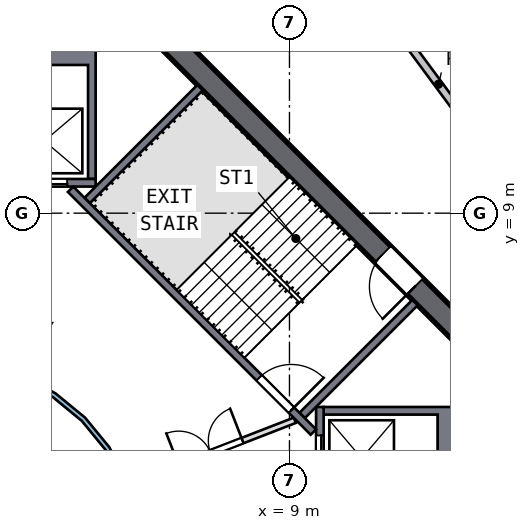
"""IFC4 building model, lengths in metres.
Left out: names, types, materials, properties, quantities, classifications, styles, units other than length and angle.
Written with IfcOpenShell. Run it as: python <this file> out.ifc"""

import sys

from ifc_helpers import new_model, si_unit, direction, frame, frame_2d, origin, place, context, subcontext, project, spatial, polyline, rectangle, outline, extrude, element, fill, save


model = new_model("IFC4")
c1 = context("Model", 3, precision=1e-05, world=origin(), true_north=direction((0.0, 1.0)))
c2 = subcontext(c1, "Body", "Model", "MODEL_VIEW")
j1 = project(units=[si_unit("LENGTHUNIT", "METRE"), si_unit("PLANEANGLEUNIT", "RADIAN")], contexts=[c1])
p1 = place(None, origin())
s1 = spatial("IfcSite", under=j1, at=p1, CompositionType="ELEMENT")
p2 = place(p1, origin())
s2 = spatial("IfcBuilding", under=s1, at=p2, CompositionType="ELEMENT")
p3 = place(p2, frame((0.0, 0.0, 183.5)))
s3 = spatial("IfcBuildingStorey", under=s2, at=p3, CompositionType="ELEMENT", Elevation=183.5)
p4 = place(p3, frame((13.788, 5.587, 0.0), z_axis=(0.0, 0.0, 1.0), x_axis=(-0.707106781, 0.707106781, 0.0)))
e1 = element("IfcWall", 1, at=p4, inside=s3, PredefinedType="SHEAR", context=c2, shape_type="SweptSolid", body=[
    extrude(rectangle(XDim=11.598, YDim=0.6, at=frame_2d((5.799, 0.0))), origin(), (0.0, 0.0, 1.0), 3.5),
])
p5 = place(p4, frame((2.099, 0.0, 0.0)))
e2 = element("IfcOpeningElement", 2, at=p5, cuts=e1, PredefinedType="OPENING", context=c2, shape_type="SweptSolid", body=[
    extrude(rectangle(XDim=1.2, YDim=2.1, at=frame_2d((0.6, 1.05))), frame((0.0, 0.31, 0.0), z_axis=(0.0, -1.0, 0.0), x_axis=(1.0, 0.0, 0.0)), (0.0, 0.0, 1.0), 0.62),
])
p6 = place(p3, origin())
e3 = element("IfcWall", 3, at=p6, inside=s3, PredefinedType="SOLIDWALL", context=c2, shape_type="SweptSolid", body=[
    extrude(outline(polyline([(13.4, 3.9), (13.4, 1.2), (9.9, 1.2), (9.9, 1.4), (12.9, 1.4), (12.9, 3.7), (9.9, 3.7), (9.9, 3.9), (13.4, 3.9)])), origin(), (0.0, 0.0, 1.0), 3.19),
])
p7 = place(p3, frame((9.8, 1.2, 0.0), z_axis=(0.0, 0.0, 1.0), x_axis=(0.0, 1.0, 0.0)))
e4 = element("IfcWall", 4, at=p7, inside=s3, PredefinedType="SOLIDWALL", context=c2, shape_type="SweptSolid", body=[
    extrude(rectangle(XDim=2.7, YDim=0.2, at=frame_2d((1.35, 0.0))), origin(), (0.0, 0.0, 1.0), 3.19),
])
p8 = place(p7, frame((0.75, 0.0, 0.0)))
e5 = element("IfcOpeningElement", 5, at=p8, cuts=e4, PredefinedType="OPENING", context=c2, shape_type="SweptSolid", body=[
    extrude(rectangle(XDim=1.2, YDim=2.1, at=frame_2d((0.6, 1.05))), frame((0.0, 0.11, 0.0), z_axis=(0.0, -1.0, 0.0), x_axis=(1.0, 0.0, 0.0)), (0.0, 0.0, 1.0), 0.22),
])
p9 = place(p3, origin())
e6 = element("IfcWall", 6, at=p9, inside=s3, PredefinedType="SOLIDWALL", context=c2, shape_type="SweptSolid", body=[
    extrude(outline(polyline([(3.9, 9.9), (3.7, 9.9), (3.7, 12.9), (1.4, 12.9), (1.4, 9.9), (1.2, 9.9), (1.2, 13.4), (3.9, 13.4), (3.9, 9.9)])), origin(), (0.0, 0.0, 1.0), 3.19),
])
p10 = place(p3, frame((1.2, 9.8, 0.0), z_axis=(0.0, 0.0, 1.0), x_axis=(1.0, 0.0, 0.0)))
e7 = element("IfcWall", 7, at=p10, inside=s3, PredefinedType="SOLIDWALL", context=c2, shape_type="SweptSolid", body=[
    extrude(rectangle(XDim=2.7, YDim=0.2, at=frame_2d((1.35, 0.0))), origin(), (0.0, 0.0, 1.0), 3.19),
])
p11 = place(p10, frame((0.75, 0.0, 0.0)))
e8 = element("IfcOpeningElement", 8, at=p11, cuts=e7, PredefinedType="OPENING", context=c2, shape_type="SweptSolid", body=[
    extrude(rectangle(XDim=1.2, YDim=2.1, at=frame_2d((0.6, 1.05))), frame((0.0, 0.11, 0.0), z_axis=(0.0, -1.0, 0.0), x_axis=(1.0, 0.0, 0.0)), (0.0, 0.0, 1.0), 0.22),
])
p12 = place(p3, frame((3.24, 9.629, 0.0), z_axis=(0.0, 0.0, 1.0), x_axis=(0.707106781, -0.707106781, 0.0)))
e9 = element("IfcWall", 9, at=p12, inside=s3, PredefinedType="SOLIDWALL", context=c2, shape_type="SweptSolid", body=[
    extrude(rectangle(XDim=9.036, YDim=0.2, at=frame_2d((4.518, 0.0))), origin(), (0.0, 0.0, 1.0), 3.19),
])
p13 = place(p12, frame((7.018, 0.0, 0.0)))
e10 = element("IfcOpeningElement", 10, at=p13, cuts=e9, PredefinedType="OPENING", context=c2, shape_type="SweptSolid", body=[
    extrude(rectangle(XDim=1.2, YDim=2.1, at=frame_2d((0.6, 1.05))), frame((0.0, 0.11, 0.0), z_axis=(0.0, -1.0, 0.0), x_axis=(1.0, 0.0, 0.0)), (0.0, 0.0, 1.0), 0.22),
])
for number, where, z_axis, x_axis in (
    (11, (9.334, 3.677, 0.0), (0.0, 0.0, 1.0), (0.707, 0.707, 0.0)),
    (12, (3.677, 9.334, 0.0), (0.0, 0.0, 1.0), (0.707, 0.707, 0.0)),
):
    element("IfcWall", number, at=place(p3, frame(where, z_axis=z_axis, x_axis=x_axis)), inside=s3, PredefinedType="SOLIDWALL", context=c2, shape_type="SweptSolid", body=[
        extrude(rectangle(XDim=4.2, YDim=0.2, at=frame_2d((2.1, 0.0))), origin(), (0.0, 0.0, 1.0), 3.19),
    ])
p14 = place(p3, frame((4.782, 1.857, 0.0), z_axis=(0.0, 0.0, 1.0), x_axis=(0.932157474, 0.362053096, 0.0)))
e13 = element("IfcWall", 13, at=p14, inside=s3, PredefinedType="PARTITIONING", context=c2, shape_type="SweptSolid", body=[
    extrude(rectangle(XDim=4.675, YDim=0.15, at=frame_2d((2.337, 0.0))), origin(), (0.0, 0.0, 1.0), 3.19),
])
p15 = place(p14, frame((1.4, 0.0, 0.0)))
e14 = element("IfcOpeningElement", 14, at=p15, cuts=e13, PredefinedType="OPENING", context=c2, shape_type="SweptSolid", body=[
    extrude(rectangle(XDim=1.8, YDim=2.1, at=frame_2d((0.9, 1.05))), frame((0.0, 0.085, 0.0), z_axis=(0.0, -1.0, 0.0), x_axis=(1.0, 0.0, 0.0)), (0.0, 0.0, 1.0), 0.17),
])
p16 = place(p3, origin())
e15 = element("IfcWall", 15, at=p16, inside=s3, PredefinedType="SOLIDWALL", context=c2, shape_type="SweptSolid", body=[
    extrude(outline(polyline([(5.021, -0.999), (4.73, -1.959), (4.257, -2.844), (3.62, -3.62), (2.844, -4.257), (1.959, -4.73), (0.999, -5.021), (0.0, -5.12), (-0.999, -5.021), (-1.959, -4.73), (-2.844, -4.257), (-3.62, -3.62), (-4.257, -2.844), (-4.73, -1.959), (-5.021, -0.999), (-5.12, 0.0), (-5.021, 0.999), (-4.73, 1.959), (-4.257, 2.844), (-3.62, 3.62), (-2.844, 4.257), (-1.959, 4.73), (-0.999, 5.021), (0.0, 5.12), (0.999, 5.021), (1.959, 4.73), (2.844, 4.257), (3.62, 3.62), (4.257, 2.844), (4.73, 1.959), (5.021, 0.999), (5.12, 0.0), (5.021, -0.999)]), holes=[polyline([(4.904, 0.976), (4.619, 1.913), (4.157, 2.778), (3.535, 3.535), (2.778, 4.157), (1.913, 4.619), (0.976, 4.904), (0.0, 5.0), (-0.976, 4.904), (-1.913, 4.619), (-2.778, 4.157), (-3.535, 3.535), (-4.157, 2.778), (-4.619, 1.913), (-4.904, 0.976), (-5.0, 0.0), (-4.904, -0.976), (-4.619, -1.913), (-4.157, -2.778), (-3.535, -3.535), (-2.778, -4.157), (-1.913, -4.619), (-0.976, -4.904), (0.0, -5.0), (0.976, -4.904), (1.913, -4.619), (2.778, -4.157), (3.535, -3.535), (4.157, -2.778), (4.619, -1.913), (4.904, -0.976), (5.0, 0.0), (4.904, 0.976)])]), origin(), (0.0, 0.0, 1.0), 3.19),
])
p17 = place(p3, frame((11.45, 14.384, 0.0), z_axis=(0.0, 0.0, 1.0), x_axis=(0.594543579, -0.804063388, 0.0)))
e16 = element("IfcWall", 16, at=p17, inside=s3, PredefinedType="SOLIDWALL", context=c2, shape_type="SweptSolid", body=[
    extrude(rectangle(XDim=9.316, YDim=0.2, at=frame_2d((4.658, 0.0))), origin(), (0.0, 0.0, 1.0), 3.19),
])
p18 = place(p17, frame((5.15, 0.0, 0.0)))
e17 = element("IfcOpeningElement", 17, at=p18, cuts=e16, PredefinedType="OPENING", context=c2, shape_type="SweptSolid", body=[
    extrude(rectangle(XDim=1.0, YDim=2.1, at=frame_2d((0.5, 1.05))), frame((0.0, 0.11, 0.0), z_axis=(0.0, -1.0, 0.0), x_axis=(1.0, 0.0, 0.0)), (0.0, 0.0, 1.0), 0.22),
])
p19 = place(p8, origin())
e18 = element("IfcDoor", 18, at=p19, inside=s3, OperationType="DOUBLE_DOOR_SLIDING", PredefinedType="DOOR", context=c2, shape_type="SweptSolid", body=[
    extrude(rectangle(XDim=1.2, YDim=2.1, at=frame_2d((0.6, 1.05))), frame((0.0, 0.025, 0.0), z_axis=(0.0, -1.0, 0.0), x_axis=(1.0, 0.0, 0.0)), (0.0, 0.0, 1.0), 0.05),
])
fill(e5, e18)
p20 = place(p11, origin())
e19 = element("IfcDoor", 19, at=p20, inside=s3, OperationType="DOUBLE_DOOR_SLIDING", PredefinedType="DOOR", context=c2, shape_type="SweptSolid", body=[
    extrude(rectangle(XDim=1.2, YDim=2.1, at=frame_2d((0.6, 1.05))), frame((0.0, 0.025, 0.0), z_axis=(0.0, -1.0, 0.0), x_axis=(1.0, 0.0, 0.0)), (0.0, 0.0, 1.0), 0.05),
])
fill(e8, e19)
p21 = place(p13, origin())
e20 = element("IfcDoor", 20, at=p21, inside=s3, OperationType="SINGLE_SWING_RIGHT", PredefinedType="DOOR", context=c2, shape_type="SweptSolid", body=[
    extrude(rectangle(XDim=1.2, YDim=2.1, at=frame_2d((0.6, 1.05))), frame((0.0, 0.025, 0.0), z_axis=(0.0, -1.0, 0.0), x_axis=(1.0, 0.0, 0.0)), (0.0, 0.0, 1.0), 0.05),
])
fill(e10, e20)
p22 = place(p5, origin())
e21 = element("IfcDoor", 21, at=p22, inside=s3, OperationType="SINGLE_SWING_LEFT", PredefinedType="DOOR", context=c2, shape_type="SweptSolid", body=[
    extrude(rectangle(XDim=1.2, YDim=2.1, at=frame_2d((0.6, 1.05))), frame((0.0, 0.025, 0.0), z_axis=(0.0, -1.0, 0.0), x_axis=(1.0, 0.0, 0.0)), (0.0, 0.0, 1.0), 0.05),
])
fill(e2, e21)
p23 = place(p15, origin())
e22 = element("IfcDoor", 22, at=p23, inside=s3, OperationType="DOUBLE_DOOR_SINGLE_SWING", PredefinedType="DOOR", context=c2, shape_type="SweptSolid", body=[
    extrude(rectangle(XDim=1.8, YDim=2.1, at=frame_2d((0.9, 1.05))), frame((0.0, 0.025, 0.0), z_axis=(0.0, -1.0, 0.0), x_axis=(1.0, 0.0, 0.0)), (0.0, 0.0, 1.0), 0.05),
])
fill(e14, e22)
save(model, sys.argv[1])
